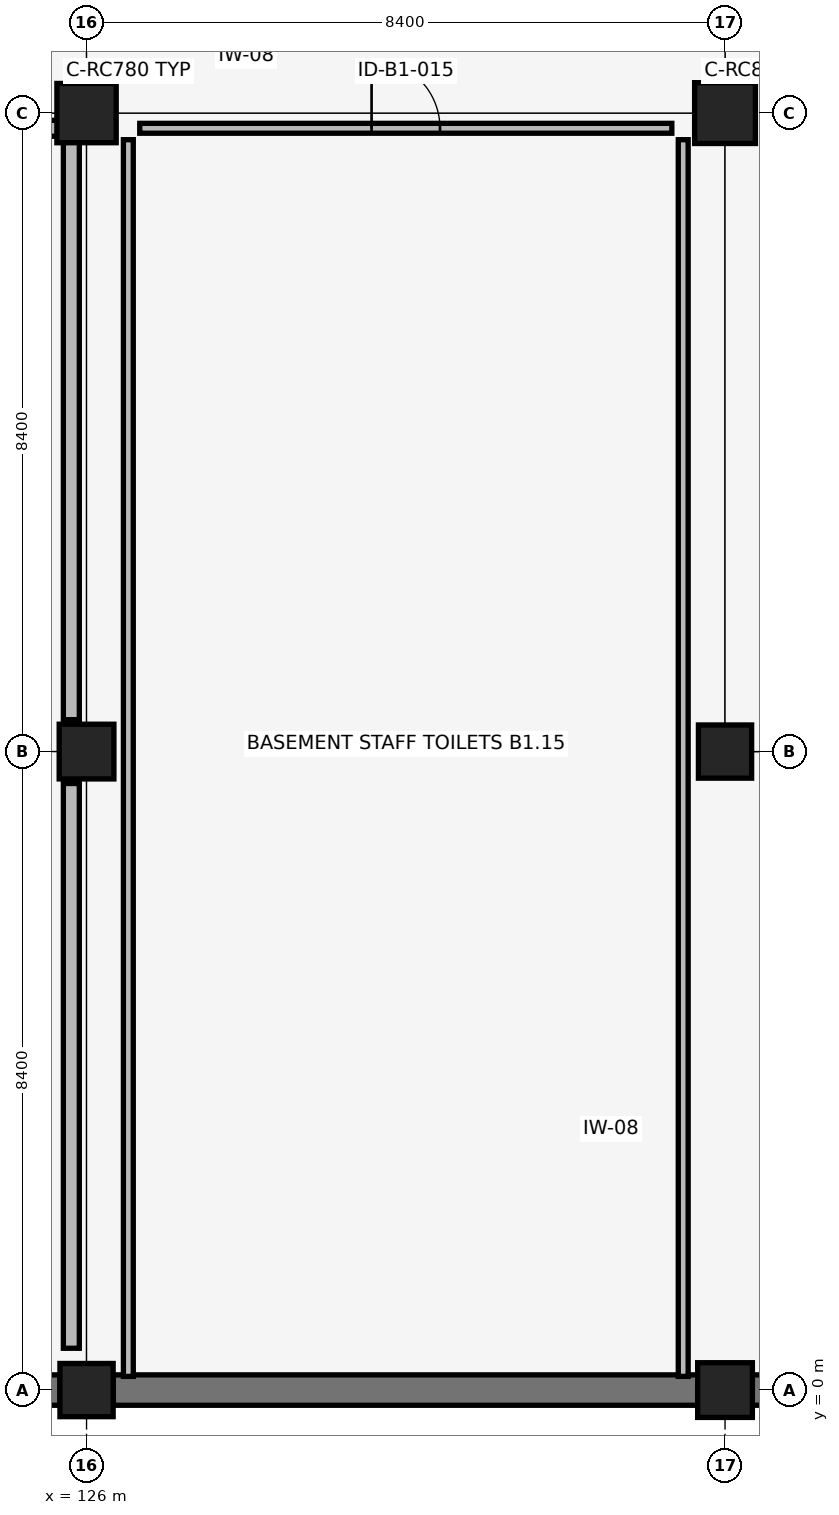
"""IFC4 building model, lengths in metres.
Left out: names, types, materials, properties, quantities, classifications, styles, units other than length and angle.
Written with IfcOpenShell. Run it as: python <this file> out.ifc"""

import sys

from ifc_helpers import new_model, si_unit, direction, frame, frame_2d, origin, origin_2d, place, context, subcontext, project, spatial, rectangle, extrude, element, fill, save


model = new_model("IFC4")
c1 = context("Model", 3, precision=1e-05, world=origin(), true_north=direction((0.0, 1.0)))
c2 = subcontext(c1, "Body", "Model", "MODEL_VIEW")
j1 = project(units=[si_unit("LENGTHUNIT", "METRE"), si_unit("PLANEANGLEUNIT", "RADIAN")], contexts=[c1])
p1 = place(None, origin())
s1 = spatial("IfcSite", under=j1, at=p1, CompositionType="ELEMENT")
p2 = place(p1, origin())
s2 = spatial("IfcBuilding", under=s1, at=p2, CompositionType="ELEMENT")
p3 = place(p2, frame((0.0, 0.0, -4.42)))
s3 = spatial("IfcBuildingStorey", under=s2, at=p3, CompositionType="ELEMENT", Elevation=-4.42)
for number, where, z_axis, x_axis in (
    (1, (117.95, 0.0, 0.0), (0.0, 0.0, 1.0), (1.0, 0.0, 0.0)),
    (2, (126.35, 0.0, 0.0), (0.0, 0.0, 1.0), (1.0, 0.0, 0.0)),
    (3, (134.75, 0.0, 0.0), (0.0, 0.0, 1.0), (1.0, 0.0, 0.0)),
):
    element("IfcWall", number, at=place(p3, frame(where, z_axis=z_axis, x_axis=x_axis)), inside=s3, PredefinedType="USERDEFINED", context=c2, shape_type="SweptSolid", body=[
        extrude(rectangle(XDim=7.7, YDim=0.4, at=frame_2d((3.85, 0.0))), origin(), (0.0, 0.0, 1.0), 4.12),
    ])
p4 = place(p3, frame((126.0, 0.0, -0.4), z_axis=(0.0, 0.0, 1.0), x_axis=(1.0, 0.0, 0.0)))
e4 = element("IfcColumn", 4, at=p4, inside=s3, PredefinedType="COLUMN", context=c2, shape_type="SweptSolid", body=[
    extrude(rectangle(XDim=0.7, YDim=0.7, at=origin_2d()), origin(), (0.0, 0.0, 1.0), 4.52),
])
p5 = place(p3, frame((126.0, 8.4, -0.4), z_axis=(0.0, 0.0, 1.0), x_axis=(1.0, 0.0, 0.0)))
e5 = element("IfcColumn", 5, at=p5, inside=s3, PredefinedType="COLUMN", context=c2, shape_type="SweptSolid", body=[
    extrude(rectangle(XDim=0.72, YDim=0.72, at=origin_2d()), origin(), (0.0, 0.0, 1.0), 4.52),
])
p6 = place(p3, frame((126.0, 16.8, -0.4), z_axis=(0.0, 0.0, 1.0), x_axis=(1.0, 0.0, 0.0)))
e6 = element("IfcColumn", 6, at=p6, inside=s3, PredefinedType="COLUMN", context=c2, shape_type="SweptSolid", body=[
    extrude(rectangle(XDim=0.78, YDim=0.78, at=origin_2d()), origin(), (0.0, 0.0, 1.0), 4.52),
])
p7 = place(p3, frame((134.4, 0.0, -0.4), z_axis=(0.0, 0.0, 1.0), x_axis=(1.0, 0.0, 0.0)))
e7 = element("IfcColumn", 7, at=p7, inside=s3, PredefinedType="COLUMN", context=c2, shape_type="SweptSolid", body=[
    extrude(rectangle(XDim=0.72, YDim=0.72, at=origin_2d()), origin(), (0.0, 0.0, 1.0), 4.52),
])
p8 = place(p3, frame((134.4, 8.4, -0.4), z_axis=(0.0, 0.0, 1.0), x_axis=(1.0, 0.0, 0.0)))
e8 = element("IfcColumn", 8, at=p8, inside=s3, PredefinedType="COLUMN", context=c2, shape_type="SweptSolid", body=[
    extrude(rectangle(XDim=0.7, YDim=0.7, at=origin_2d()), origin(), (0.0, 0.0, 1.0), 4.52),
])
p9 = place(p3, frame((134.4, 16.8, -0.4), z_axis=(0.0, 0.0, 1.0), x_axis=(1.0, 0.0, 0.0)))
e9 = element("IfcColumn", 9, at=p9, inside=s3, PredefinedType="COLUMN", context=c2, shape_type="SweptSolid", body=[
    extrude(rectangle(XDim=0.8, YDim=0.8, at=origin_2d()), origin(), (0.0, 0.0, 1.0), 4.52),
])
p10 = place(p3, frame((118.02, 16.6, 0.0), z_axis=(0.0, 0.0, 1.0), x_axis=(1.0, 0.0, 0.0)))
e10 = element("IfcWall", 10, at=p10, inside=s3, PredefinedType="PARTITIONING", context=c2, shape_type="SweptSolid", body=[
    extrude(rectangle(XDim=7.63, YDim=0.21, at=frame_2d((3.815, 0.0))), origin(), (0.0, 0.0, 1.0), 3.17),
])
p11 = place(p3, frame((125.8, 0.55, 0.0), z_axis=(0.0, 0.0, 1.0), x_axis=(0.0, 1.0, 0.0)))
e11 = element("IfcWall", 11, at=p11, inside=s3, PredefinedType="PARTITIONING", context=c2, shape_type="SweptSolid", body=[
    extrude(rectangle(XDim=7.43, YDim=0.21, at=frame_2d((3.715, 0.0))), origin(), (0.0, 0.0, 1.0), 3.57),
])
p12 = place(p3, frame((125.8, 8.82, 0.0), z_axis=(0.0, 0.0, 1.0), x_axis=(0.0, 1.0, 0.0)))
e12 = element("IfcWall", 12, at=p12, inside=s3, PredefinedType="PARTITIONING", context=c2, shape_type="SweptSolid", body=[
    extrude(rectangle(XDim=7.63, YDim=0.21, at=frame_2d((3.815, 0.0))), origin(), (0.0, 0.0, 1.0), 3.17),
])
p13 = place(p3, frame((126.7, 16.6, 0.0), z_axis=(0.0, 0.0, 1.0), x_axis=(1.0, 0.0, 0.0)))
e13 = element("IfcWall", 13, at=p13, inside=s3, PredefinedType="PARTITIONING", context=c2, shape_type="SweptSolid", body=[
    extrude(rectangle(XDim=7.0, YDim=0.13, at=frame_2d((3.5, 0.0))), origin(), (0.0, 0.0, 1.0), 3.17),
])
p14 = place(p13, frame((3.05, 0.0, 0.0)))
e14 = element("IfcOpeningElement", 14, at=p14, cuts=e13, PredefinedType="OPENING", context=c2, shape_type="SweptSolid", body=[
    extrude(rectangle(XDim=0.9, YDim=2.1, at=frame_2d((0.45, 1.05))), frame((0.0, 0.075, 0.0), z_axis=(0.0, -1.0, 0.0), x_axis=(1.0, 0.0, 0.0)), (0.0, 0.0, 1.0), 0.15),
])
for number, where, z_axis, x_axis in (
    (15, (133.85, 0.18, 0.0), (0.0, 0.0, 1.0), (0.0, 1.0, 0.0)),
    (16, (126.55, 0.18, 0.0), (0.0, 0.0, 1.0), (0.0, 1.0, 0.0)),
):
    element("IfcWall", number, at=place(p3, frame(where, z_axis=z_axis, x_axis=x_axis)), inside=s3, PredefinedType="PARTITIONING", context=c2, shape_type="SweptSolid", body=[
        extrude(rectangle(XDim=16.27, YDim=0.13, at=frame_2d((8.135, 0.0))), origin(), (0.0, 0.0, 1.0), 3.17),
    ])
p15 = place(p14, origin())
e17 = element("IfcDoor", 17, at=p15, inside=s3, OperationType="SINGLE_SWING_LEFT", PredefinedType="DOOR", context=c2, shape_type="SweptSolid", body=[
    extrude(rectangle(XDim=0.9, YDim=2.1, at=frame_2d((0.45, 1.05))), frame((0.0, 0.025, 0.0), z_axis=(0.0, -1.0, 0.0), x_axis=(1.0, 0.0, 0.0)), (0.0, 0.0, 1.0), 0.05),
])
fill(e14, e17)
save(model, sys.argv[1])
